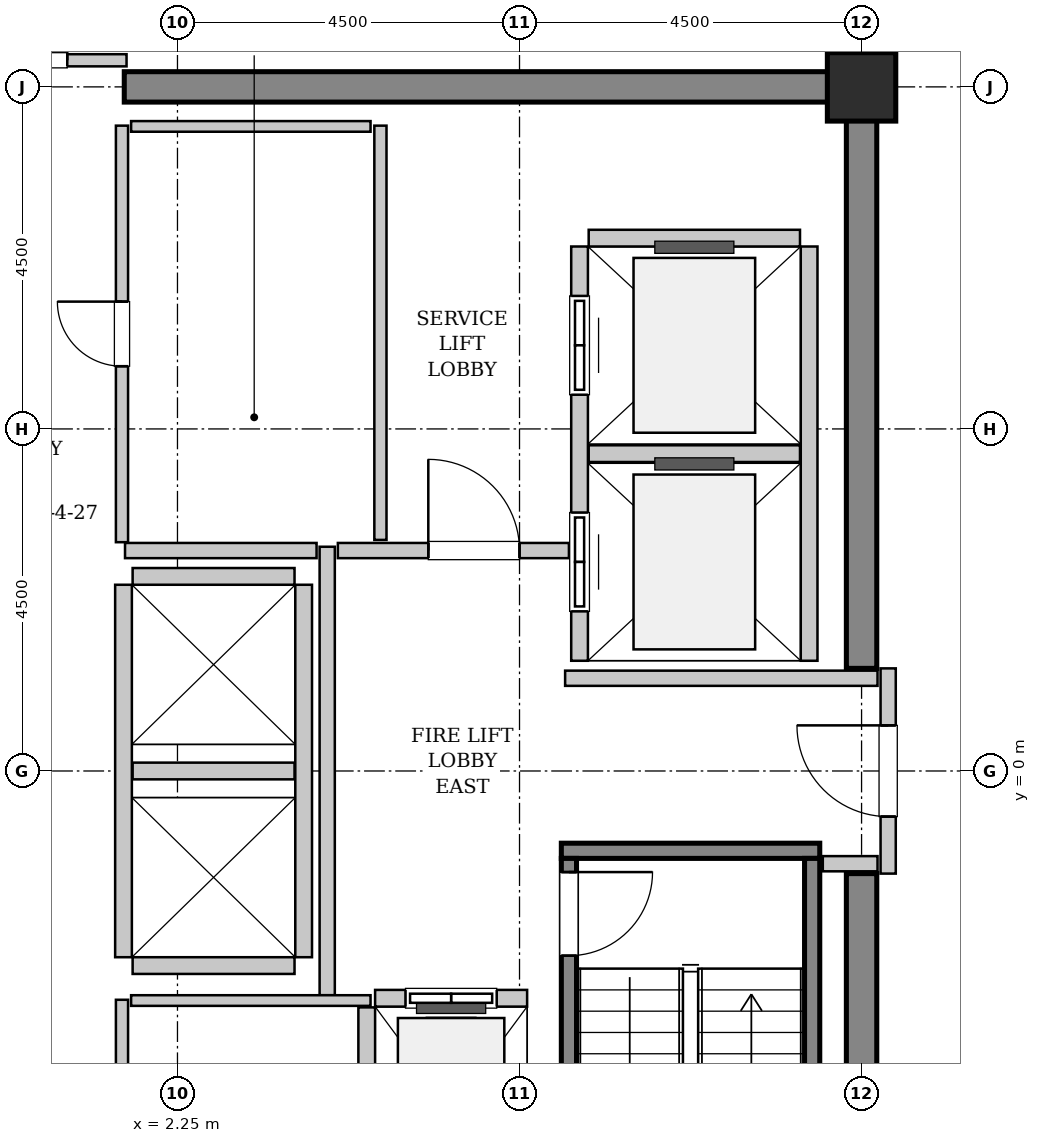
"""IFC4 building model, lengths in metres.
Left out: names, types, materials, properties, quantities, classifications, styles, units other than length and angle.
Written with IfcOpenShell. Run it as: python <this file> out.ifc"""

import sys

from ifc_helpers import new_model, si_unit, direction, frame, frame_2d, origin, origin_2d, place, context, subcontext, project, spatial, rectangle, extrude, source, transform, mapped, element, fill, save


model = new_model("IFC4")
c1 = context("Model", 3, precision=1e-05, world=origin(), true_north=direction((0.0, 1.0)))
c2 = subcontext(c1, "Body", "Model", "MODEL_VIEW")
j1 = project(units=[si_unit("LENGTHUNIT", "METRE"), si_unit("PLANEANGLEUNIT", "RADIAN")], contexts=[c1])
p1 = place(None, origin())
s1 = spatial("IfcSite", under=j1, at=p1, CompositionType="ELEMENT")
p2 = place(p1, origin())
s2 = spatial("IfcBuilding", under=s1, at=p2, CompositionType="ELEMENT")
p3 = place(p2, frame((0.0, 0.0, 341.4)))
s3 = spatial("IfcBuildingStorey", under=s2, at=p3, CompositionType="ELEMENT", Elevation=341.4)
m1 = source(origin(), c2, "Body", "SweptSolid", [
    extrude(rectangle(XDim=9.9, YDim=0.4, at=frame_2d((4.95, 0.0))), origin(), (0.0, 0.0, 1.0), 3.8),
])
p4 = place(p3, frame((1.55, 9.0, 0.0), z_axis=(0.0, 0.0, 1.0), x_axis=(1.0, 0.0, 0.0)))
e1 = element("IfcWall", 1, at=p4, inside=s3, PredefinedType="SHEAR", context=c2, shape_type="MappedRepresentation", body=[
    mapped(m1, transform((0.0, 0.0, 0.0), x_axis=(1.0, 0.0, 0.0), y_axis=(0.0, 1.0, 0.0), z_axis=(0.0, 0.0, 1.0), scale=1.0)),
])
m2 = source(origin(), c2, "Body", "SweptSolid", [
    extrude(rectangle(XDim=7.45, YDim=0.4, at=frame_2d((3.725, 0.0))), origin(), (0.0, 0.0, 1.0), 3.8),
])
for number, where, z_axis, x_axis in (
    (2, (11.25, -8.8, 0.0), (0.0, 0.0, 1.0), (0.0, 1.0, 0.0)),
    (3, (11.25, 1.35, 0.0), (0.0, 0.0, 1.0), (0.0, 1.0, 0.0)),
):
    element("IfcWall", number, at=place(p3, frame(where, z_axis=z_axis, x_axis=x_axis)), inside=s3, PredefinedType="SHEAR", context=c2, shape_type="MappedRepresentation", body=[
        mapped(m2, transform((0.0, 0.0, 0.0), x_axis=(1.0, 0.0, 0.0), y_axis=(0.0, 1.0, 0.0), z_axis=(0.0, 0.0, 1.0), scale=1.0)),
    ])
m3 = source(origin(), c2, "Body", "SweptSolid", [
    extrude(rectangle(XDim=0.9, YDim=0.9, at=origin_2d()), origin(), (0.0, 0.0, 1.0), 3.8),
])
p5 = place(p3, frame((11.25, 9.0, 0.0), z_axis=(0.0, 0.0, 1.0), x_axis=(1.0, 0.0, 0.0)))
e4 = element("IfcColumn", 4, at=p5, inside=s3, PredefinedType="COLUMN", context=c2, shape_type="MappedRepresentation", body=[
    mapped(m3, transform((0.0, 0.0, 0.0), x_axis=(1.0, 0.0, 0.0), y_axis=(0.0, 1.0, 0.0), z_axis=(0.0, 0.0, 1.0), scale=1.0)),
])
m4 = source(origin(), c2, "Body", "SweptSolid", [
    extrude(rectangle(XDim=3.4, YDim=0.2, at=frame_2d((1.7, 0.0))), origin(), (0.0, 0.0, 1.0), 3.8),
])
p6 = place(p3, frame((7.3, -1.05, 0.0), z_axis=(0.0, 0.0, 1.0), x_axis=(1.0, 0.0, 0.0)))
e5 = element("IfcWall", 5, at=p6, inside=s3, PredefinedType="SOLIDWALL", context=c2, shape_type="MappedRepresentation", body=[
    mapped(m4, transform((0.0, 0.0, 0.0), x_axis=(1.0, 0.0, 0.0), y_axis=(0.0, 1.0, 0.0), z_axis=(0.0, 0.0, 1.0), scale=1.0)),
])
m5 = source(origin(), c2, "Body", "SweptSolid", [
    extrude(rectangle(XDim=7.1, YDim=0.2, at=frame_2d((3.55, 0.0))), origin(), (0.0, 0.0, 1.0), 3.8),
])
p7 = place(p3, frame((7.4, -1.15, 0.0), z_axis=(0.0, 0.0, 1.0), x_axis=(0.0, -1.0, 0.0)))
e6 = element("IfcWall", 6, at=p7, inside=s3, PredefinedType="SOLIDWALL", context=c2, shape_type="MappedRepresentation", body=[
    mapped(m5, transform((0.0, 0.0, 0.0), x_axis=(1.0, 0.0, 0.0), y_axis=(0.0, 1.0, 0.0), z_axis=(0.0, 0.0, 1.0), scale=1.0)),
])
p8 = place(p7, frame((0.18, 0.0, 0.0)))
e7 = element("IfcOpeningElement", 7, at=p8, cuts=e6, PredefinedType="OPENING", context=c2, shape_type="SweptSolid", body=[
    extrude(rectangle(XDim=1.1, YDim=2.15, at=frame_2d((0.55, 1.075))), frame((0.0, 0.11, 0.0), z_axis=(0.0, -1.0, 0.0), x_axis=(1.0, 0.0, 0.0)), (0.0, 0.0, 1.0), 0.22),
])
p9 = place(p3, frame((10.6, -1.15, 0.0), z_axis=(0.0, 0.0, 1.0), x_axis=(0.0, -1.0, 0.0)))
e8 = element("IfcWall", 8, at=p9, inside=s3, PredefinedType="SOLIDWALL", context=c2, shape_type="MappedRepresentation", body=[
    mapped(m5, transform((0.0, 0.0, 0.0), x_axis=(1.0, 0.0, 0.0), y_axis=(0.0, 1.0, 0.0), z_axis=(0.0, 0.0, 1.0), scale=1.0)),
])
m6 = source(origin(), c2, "Body", "SweptSolid", [
    extrude(rectangle(XDim=2.0, YDim=0.22, at=frame_2d((1.0, 0.0))), origin(), (0.0, 0.0, 1.0), 3.535),
])
p10 = place(p3, frame((6.85, -2.99, 0.0), z_axis=(0.0, 0.0, 1.0), x_axis=(-1.0, 0.0, 0.0)))
e9 = element("IfcWall", 9, at=p10, inside=s3, PredefinedType="SOLIDWALL", context=c2, shape_type="MappedRepresentation", body=[
    mapped(m6, transform((0.0, 0.0, 0.0), x_axis=(1.0, 0.0, 0.0), y_axis=(0.0, 1.0, 0.0), z_axis=(0.0, 0.0, 1.0), scale=1.0)),
])
p11 = place(p10, frame((0.4, 0.0, 0.0)))
e10 = element("IfcOpeningElement", 10, at=p11, cuts=e9, PredefinedType="OPENING", context=c2, shape_type="SweptSolid", body=[
    extrude(rectangle(XDim=1.2, YDim=2.2, at=frame_2d((0.6, 1.1))), frame((0.0, 0.12, 0.0), z_axis=(0.0, -1.0, 0.0), x_axis=(1.0, 0.0, 0.0)), (0.0, 0.0, 1.0), 0.24),
])
m7 = source(origin(), c2, "Body", "SweptSolid", [
    extrude(rectangle(XDim=2.68, YDim=0.22, at=frame_2d((1.34, 0.0))), origin(), (0.0, 0.0, 1.0), 3.535),
])
p12 = place(p3, frame((4.74, -3.11, 0.0), z_axis=(0.0, 0.0, 1.0), x_axis=(0.0, -1.0, 0.0)))
e11 = element("IfcWall", 11, at=p12, inside=s3, PredefinedType="SOLIDWALL", context=c2, shape_type="MappedRepresentation", body=[
    mapped(m7, transform((0.0, 0.0, 0.0), x_axis=(1.0, 0.0, 0.0), y_axis=(0.0, 1.0, 0.0), z_axis=(0.0, 0.0, 1.0), scale=1.0)),
])
m8 = source(origin(), c2, "Body", "SweptSolid", [
    extrude(rectangle(XDim=5.45, YDim=0.22, at=frame_2d((2.725, 0.0))), origin(), (0.0, 0.0, 1.0), 3.535),
])
p13 = place(p3, frame((7.54, 6.9, 0.0), z_axis=(0.0, 0.0, 1.0), x_axis=(0.0, -1.0, 0.0)))
e12 = element("IfcWall", 12, at=p13, inside=s3, PredefinedType="SOLIDWALL", context=c2, shape_type="MappedRepresentation", body=[
    mapped(m8, transform((0.0, 0.0, 0.0), x_axis=(1.0, 0.0, 0.0), y_axis=(0.0, 1.0, 0.0), z_axis=(0.0, 0.0, 1.0), scale=1.0)),
])
p14 = place(p13, frame((3.5, 0.0, 0.0)))
e13 = element("IfcOpeningElement", 13, at=p14, cuts=e12, PredefinedType="OPENING", context=c2, shape_type="SweptSolid", body=[
    extrude(rectangle(XDim=1.3, YDim=2.3, at=frame_2d((0.65, 1.15))), frame((0.0, 0.12, 0.0), z_axis=(0.0, -1.0, 0.0), x_axis=(1.0, 0.0, 0.0)), (0.0, 0.0, 1.0), 0.24),
])
p15 = place(p13, frame((0.65, 0.0, 0.0)))
e14 = element("IfcOpeningElement", 14, at=p15, cuts=e12, PredefinedType="OPENING", context=c2, shape_type="SweptSolid", body=[
    extrude(rectangle(XDim=1.3, YDim=2.3, at=frame_2d((0.65, 1.15))), frame((0.0, 0.12, 0.0), z_axis=(0.0, -1.0, 0.0), x_axis=(1.0, 0.0, 0.0)), (0.0, 0.0, 1.0), 0.24),
])
p16 = place(p3, frame((10.56, 1.45, 0.0), z_axis=(0.0, 0.0, 1.0), x_axis=(0.0, 1.0, 0.0)))
e15 = element("IfcWall", 15, at=p16, inside=s3, PredefinedType="SOLIDWALL", context=c2, shape_type="MappedRepresentation", body=[
    mapped(m8, transform((0.0, 0.0, 0.0), x_axis=(1.0, 0.0, 0.0), y_axis=(0.0, 1.0, 0.0), z_axis=(0.0, 0.0, 1.0), scale=1.0)),
])
m9 = source(origin(), c2, "Body", "SweptSolid", [
    extrude(rectangle(XDim=2.78, YDim=0.22, at=frame_2d((1.39, 0.0))), origin(), (0.0, 0.0, 1.0), 3.535),
])
for number, where, z_axis, x_axis in (
    (16, (7.66, 4.175, 0.0), (0.0, 0.0, 1.0), (1.0, 0.0, 0.0)),
    (17, (10.44, 7.01, 0.0), (0.0, 0.0, 1.0), (-1.0, 0.0, 0.0)),
):
    element("IfcWall", number, at=place(p3, frame(where, z_axis=z_axis, x_axis=x_axis)), inside=s3, PredefinedType="SOLIDWALL", context=c2, shape_type="MappedRepresentation", body=[
        mapped(m9, transform((0.0, 0.0, 0.0), x_axis=(1.0, 0.0, 0.0), y_axis=(0.0, 1.0, 0.0), z_axis=(0.0, 0.0, 1.0), scale=1.0)),
    ])
m10 = source(origin(), c2, "Body", "SweptSolid", [
    extrude(rectangle(XDim=4.9, YDim=0.22, at=frame_2d((2.45, 0.0))), origin(), (0.0, 0.0, 1.0), 3.535),
])
for number, where, z_axis, x_axis in (
    (18, (1.54, 2.45, 0.0), (0.0, 0.0, 1.0), (0.0, -1.0, 0.0)),
    (19, (3.91, -2.45, 0.0), (0.0, 0.0, 1.0), (0.0, 1.0, 0.0)),
):
    element("IfcWall", number, at=place(p3, frame(where, z_axis=z_axis, x_axis=x_axis)), inside=s3, PredefinedType="SOLIDWALL", context=c2, shape_type="MappedRepresentation", body=[
        mapped(m10, transform((0.0, 0.0, 0.0), x_axis=(1.0, 0.0, 0.0), y_axis=(0.0, 1.0, 0.0), z_axis=(0.0, 0.0, 1.0), scale=1.0)),
    ])
m11 = source(origin(), c2, "Body", "SweptSolid", [
    extrude(rectangle(XDim=2.13, YDim=0.22, at=frame_2d((1.065, 0.0))), origin(), (0.0, 0.0, 1.0), 3.535),
])
for number, where, z_axis, x_axis in (
    (20, (1.66, -2.56, 0.0), (0.0, 0.0, 1.0), (1.0, 0.0, 0.0)),
    (21, (1.66, 0.0, 0.0), (0.0, 0.0, 1.0), (1.0, 0.0, 0.0)),
    (22, (3.79, 2.56, 0.0), (0.0, 0.0, 1.0), (-1.0, 0.0, 0.0)),
):
    element("IfcWall", number, at=place(p3, frame(where, z_axis=z_axis, x_axis=x_axis)), inside=s3, PredefinedType="SOLIDWALL", context=c2, shape_type="MappedRepresentation", body=[
        mapped(m11, transform((0.0, 0.0, 0.0), x_axis=(1.0, 0.0, 0.0), y_axis=(0.0, 1.0, 0.0), z_axis=(0.0, 0.0, 1.0), scale=1.0)),
    ])
m12 = source(origin(), c2, "Body", "SweptSolid", [
    extrude(rectangle(XDim=2.7, YDim=0.2, at=frame_2d((1.35, 0.0))), origin(), (0.0, 0.0, 1.0), 2.625),
])
p17 = place(p3, frame((11.6, -1.35, 0.0), z_axis=(0.0, 0.0, 1.0), x_axis=(0.0, 1.0, 0.0)))
e23 = element("IfcWall", 23, at=p17, inside=s3, PredefinedType="PARTITIONING", context=c2, shape_type="MappedRepresentation", body=[
    mapped(m12, transform((0.0, 0.0, 0.0), x_axis=(1.0, 0.0, 0.0), y_axis=(0.0, 1.0, 0.0), z_axis=(0.0, 0.0, 1.0), scale=1.0)),
])
p18 = place(p17, frame((0.75, 0.0, 0.0)))
e24 = element("IfcOpeningElement", 24, at=p18, cuts=e23, PredefinedType="OPENING", context=c2, shape_type="SweptSolid", body=[
    extrude(rectangle(XDim=1.2, YDim=2.15, at=frame_2d((0.6, 1.075))), frame((0.0, 0.11, 0.0), z_axis=(0.0, -1.0, 0.0), x_axis=(1.0, 0.0, 0.0)), (0.0, 0.0, 1.0), 0.22),
])
m13 = source(origin(), c2, "Body", "SweptSolid", [
    extrude(rectangle(XDim=5.9, YDim=0.2, at=frame_2d((2.95, 0.0))), origin(), (0.0, 0.0, 1.0), 3.535),
])
p19 = place(p3, frame((4.22, -2.95, 0.0), z_axis=(0.0, 0.0, 1.0), x_axis=(0.0, 1.0, 0.0)))
e25 = element("IfcWall", 25, at=p19, inside=s3, PredefinedType="PARTITIONING", context=c2, shape_type="MappedRepresentation", body=[
    mapped(m13, transform((0.0, 0.0, 0.0), x_axis=(1.0, 0.0, 0.0), y_axis=(0.0, 1.0, 0.0), z_axis=(0.0, 0.0, 1.0), scale=1.0)),
])
m14 = source(origin(), c2, "Body", "SweptSolid", [
    extrude(rectangle(XDim=2.52, YDim=0.2, at=frame_2d((1.26, 0.0))), origin(), (0.0, 0.0, 1.0), 3.535),
])
p20 = place(p3, frame((1.56, 2.9, 0.0), z_axis=(0.0, 0.0, 1.0), x_axis=(1.0, 0.0, 0.0)))
e26 = element("IfcWall", 26, at=p20, inside=s3, PredefinedType="PARTITIONING", context=c2, shape_type="MappedRepresentation", body=[
    mapped(m14, transform((0.0, 0.0, 0.0), x_axis=(1.0, 0.0, 0.0), y_axis=(0.0, 1.0, 0.0), z_axis=(0.0, 0.0, 1.0), scale=1.0)),
])
m15 = source(origin(), c2, "Body", "SweptSolid", [
    extrude(rectangle(XDim=3.04, YDim=0.2, at=frame_2d((1.52, 0.0))), origin(), (0.0, 0.0, 1.0), 3.535),
])
p21 = place(p3, frame((4.36, 2.9, 0.0), z_axis=(0.0, 0.0, 1.0), x_axis=(1.0, 0.0, 0.0)))
e27 = element("IfcWall", 27, at=p21, inside=s3, PredefinedType="PARTITIONING", context=c2, shape_type="MappedRepresentation", body=[
    mapped(m15, transform((0.0, 0.0, 0.0), x_axis=(1.0, 0.0, 0.0), y_axis=(0.0, 1.0, 0.0), z_axis=(0.0, 0.0, 1.0), scale=1.0)),
])
p22 = place(p21, frame((1.19, 0.0, 0.0)))
e28 = element("IfcOpeningElement", 28, at=p22, cuts=e27, PredefinedType="OPENING", context=c2, shape_type="SweptSolid", body=[
    extrude(rectangle(XDim=1.2, YDim=2.15, at=frame_2d((0.6, 1.075))), frame((0.0, 0.11, 0.0), z_axis=(0.0, -1.0, 0.0), x_axis=(1.0, 0.0, 0.0)), (0.0, 0.0, 1.0), 0.22),
])
m16 = source(origin(), c2, "Body", "SweptSolid", [
    extrude(rectangle(XDim=4.11, YDim=0.2, at=frame_2d((2.055, 0.0))), origin(), (0.0, 0.0, 1.0), 3.535),
])
p23 = place(p3, frame((7.35, 1.22, 0.0), z_axis=(0.0, 0.0, 1.0), x_axis=(1.0, 0.0, 0.0)))
e29 = element("IfcWall", 29, at=p23, inside=s3, PredefinedType="PARTITIONING", context=c2, shape_type="MappedRepresentation", body=[
    mapped(m16, transform((0.0, 0.0, 0.0), x_axis=(1.0, 0.0, 0.0), y_axis=(0.0, 1.0, 0.0), z_axis=(0.0, 0.0, 1.0), scale=1.0)),
])
m17 = source(origin(), c2, "Body", "SweptSolid", [
    extrude(rectangle(XDim=0.72, YDim=0.2, at=frame_2d((0.36, 0.0))), origin(), (0.0, 0.0, 1.0), 3.535),
])
p24 = place(p3, frame((10.74, -1.22, 0.0), z_axis=(0.0, 0.0, 1.0), x_axis=(1.0, 0.0, 0.0)))
e30 = element("IfcWall", 30, at=p24, inside=s3, PredefinedType="PARTITIONING", context=c2, shape_type="MappedRepresentation", body=[
    mapped(m17, transform((0.0, 0.0, 0.0), x_axis=(1.0, 0.0, 0.0), y_axis=(0.0, 1.0, 0.0), z_axis=(0.0, 0.0, 1.0), scale=1.0)),
])
m18 = source(origin(), c2, "Body", "SweptSolid", [
    extrude(rectangle(XDim=3.16, YDim=0.16, at=frame_2d((1.58, 0.0))), origin(), (0.0, 0.0, 1.0), 2.625),
])
p25 = place(p3, frame((-1.58, 9.35, 0.0), z_axis=(0.0, 0.0, 1.0), x_axis=(1.0, 0.0, 0.0)))
e31 = element("IfcWall", 31, at=p25, inside=s3, PredefinedType="PARTITIONING", context=c2, shape_type="MappedRepresentation", body=[
    mapped(m18, transform((0.0, 0.0, 0.0), x_axis=(1.0, 0.0, 0.0), y_axis=(0.0, 1.0, 0.0), z_axis=(0.0, 0.0, 1.0), scale=1.0)),
])
p26 = place(p25, frame((0.78, 0.0, 0.0)))
e32 = element("IfcOpeningElement", 32, at=p26, cuts=e31, PredefinedType="OPENING", context=c2, shape_type="SweptSolid", body=[
    extrude(rectangle(XDim=1.6, YDim=2.3, at=frame_2d((0.8, 1.15))), frame((0.0, 0.09, 0.0), z_axis=(0.0, -1.0, 0.0), x_axis=(1.0, 0.0, 0.0)), (0.0, 0.0, 1.0), 0.18),
])
m19 = source(origin(), c2, "Body", "SweptSolid", [
    extrude(rectangle(XDim=5.45, YDim=0.16, at=frame_2d((2.725, 0.0))), origin(), (0.0, 0.0, 1.0), 3.535),
])
p27 = place(p3, frame((4.92, 3.04, 0.0), z_axis=(0.0, 0.0, 1.0), x_axis=(0.0, 1.0, 0.0)))
e33 = element("IfcWall", 33, at=p27, inside=s3, PredefinedType="PARTITIONING", context=c2, shape_type="MappedRepresentation", body=[
    mapped(m19, transform((0.0, 0.0, 0.0), x_axis=(1.0, 0.0, 0.0), y_axis=(0.0, 1.0, 0.0), z_axis=(0.0, 0.0, 1.0), scale=1.0)),
])
m20 = source(origin(), c2, "Body", "SweptSolid", [
    extrude(rectangle(XDim=5.48, YDim=0.16, at=frame_2d((2.74, 0.0))), origin(), (0.0, 0.0, 1.0), 3.535),
])
p28 = place(p3, frame((1.52, 3.01, 0.0), z_axis=(0.0, 0.0, 1.0), x_axis=(0.0, 1.0, 0.0)))
e34 = element("IfcWall", 34, at=p28, inside=s3, PredefinedType="PARTITIONING", context=c2, shape_type="MappedRepresentation", body=[
    mapped(m20, transform((0.0, 0.0, 0.0), x_axis=(1.0, 0.0, 0.0), y_axis=(0.0, 1.0, 0.0), z_axis=(0.0, 0.0, 1.0), scale=1.0)),
])
p29 = place(p28, frame((2.315, 0.0, 0.0)))
e35 = element("IfcOpeningElement", 35, at=p29, cuts=e34, PredefinedType="OPENING", context=c2, shape_type="SweptSolid", body=[
    extrude(rectangle(XDim=0.85, YDim=2.1, at=frame_2d((0.425, 1.05))), frame((0.0, 0.09, 0.0), z_axis=(0.0, -1.0, 0.0), x_axis=(1.0, 0.0, 0.0)), (0.0, 0.0, 1.0), 0.18),
])
m21 = source(origin(), c2, "Body", "SweptSolid", [
    extrude(rectangle(XDim=3.15, YDim=0.14, at=frame_2d((1.575, 0.0))), origin(), (0.0, 0.0, 1.0), 3.535),
])
p30 = place(p3, frame((1.64, 8.48, 0.0), z_axis=(0.0, 0.0, 1.0), x_axis=(1.0, 0.0, 0.0)))
e36 = element("IfcWall", 36, at=p30, inside=s3, PredefinedType="PARTITIONING", context=c2, shape_type="MappedRepresentation", body=[
    mapped(m21, transform((0.0, 0.0, 0.0), x_axis=(1.0, 0.0, 0.0), y_axis=(0.0, 1.0, 0.0), z_axis=(0.0, 0.0, 1.0), scale=1.0)),
])
p31 = place(p3, frame((1.52, -8.49, 0.0), z_axis=(0.0, 0.0, 1.0), x_axis=(0.0, 1.0, 0.0)))
e37 = element("IfcWall", 37, at=p31, inside=s3, PredefinedType="PARTITIONING", context=c2, shape_type="MappedRepresentation", body=[
    mapped(m20, transform((0.0, 0.0, 0.0), x_axis=(1.0, 0.0, 0.0), y_axis=(0.0, 1.0, 0.0), z_axis=(0.0, 0.0, 1.0), scale=1.0)),
])
p32 = place(p31, frame((2.315, 0.0, 0.0)))
e38 = element("IfcOpeningElement", 38, at=p32, cuts=e37, PredefinedType="OPENING", context=c2, shape_type="SweptSolid", body=[
    extrude(rectangle(XDim=0.85, YDim=2.1, at=frame_2d((0.425, 1.05))), frame((0.0, 0.09, 0.0), z_axis=(0.0, -1.0, 0.0), x_axis=(1.0, 0.0, 0.0)), (0.0, 0.0, 1.0), 0.18),
])
p33 = place(p3, frame((1.64, -3.02, 0.0), z_axis=(0.0, 0.0, 1.0), x_axis=(1.0, 0.0, 0.0)))
e39 = element("IfcWall", 39, at=p33, inside=s3, PredefinedType="PARTITIONING", context=c2, shape_type="MappedRepresentation", body=[
    mapped(m21, transform((0.0, 0.0, 0.0), x_axis=(1.0, 0.0, 0.0), y_axis=(0.0, 1.0, 0.0), z_axis=(0.0, 0.0, 1.0), scale=1.0)),
])
m22 = source(origin(), c2, "Body", "SweptSolid", [
    extrude(rectangle(XDim=1.1, YDim=2.15, at=frame_2d((0.55, 1.075))), frame((0.0, 0.025, 0.0), z_axis=(0.0, -1.0, 0.0), x_axis=(1.0, 0.0, 0.0)), (0.0, 0.0, 1.0), 0.05),
])
p34 = place(p8, origin())
e40 = element("IfcDoor", 40, at=p34, inside=s3, OperationType="SINGLE_SWING_LEFT", PredefinedType="DOOR", context=c2, shape_type="MappedRepresentation", body=[
    mapped(m22, transform((0.0, 0.0, 0.0), x_axis=(1.0, 0.0, 0.0), y_axis=(0.0, 1.0, 0.0), z_axis=(0.0, 0.0, 1.0), scale=1.0)),
])
fill(e7, e40)
m23 = source(origin(), c2, "Body", "SweptSolid", [
    extrude(rectangle(XDim=1.2, YDim=2.2, at=frame_2d((0.6, 1.1))), frame((0.0, 0.025, 0.0), z_axis=(0.0, -1.0, 0.0), x_axis=(1.0, 0.0, 0.0)), (0.0, 0.0, 1.0), 0.05),
])
p35 = place(p11, origin())
e41 = element("IfcDoor", 41, at=p35, inside=s3, OperationType="SLIDING_TO_LEFT", PredefinedType="DOOR", context=c2, shape_type="MappedRepresentation", body=[
    mapped(m23, transform((0.0, 0.0, 0.0), x_axis=(1.0, 0.0, 0.0), y_axis=(0.0, 1.0, 0.0), z_axis=(0.0, 0.0, 1.0), scale=1.0)),
])
fill(e10, e41)
m24 = source(origin(), c2, "Body", "SweptSolid", [
    extrude(rectangle(XDim=1.3, YDim=2.3, at=frame_2d((0.65, 1.15))), frame((0.0, 0.025, 0.0), z_axis=(0.0, -1.0, 0.0), x_axis=(1.0, 0.0, 0.0)), (0.0, 0.0, 1.0), 0.05),
])
p36 = place(p14, origin())
e42 = element("IfcDoor", 42, at=p36, inside=s3, OperationType="SLIDING_TO_RIGHT", PredefinedType="DOOR", context=c2, shape_type="MappedRepresentation", body=[
    mapped(m24, transform((0.0, 0.0, 0.0), x_axis=(1.0, 0.0, 0.0), y_axis=(0.0, 1.0, 0.0), z_axis=(0.0, 0.0, 1.0), scale=1.0)),
])
fill(e13, e42)
p37 = place(p15, origin())
e43 = element("IfcDoor", 43, at=p37, inside=s3, OperationType="SLIDING_TO_RIGHT", PredefinedType="DOOR", context=c2, shape_type="MappedRepresentation", body=[
    mapped(m24, transform((0.0, 0.0, 0.0), x_axis=(1.0, 0.0, 0.0), y_axis=(0.0, 1.0, 0.0), z_axis=(0.0, 0.0, 1.0), scale=1.0)),
])
fill(e14, e43)
m25 = source(origin(), c2, "Body", "SweptSolid", [
    extrude(rectangle(XDim=1.2, YDim=2.15, at=frame_2d((0.6, 1.075))), frame((0.0, 0.025, 0.0), z_axis=(0.0, -1.0, 0.0), x_axis=(1.0, 0.0, 0.0)), (0.0, 0.0, 1.0), 0.05),
])
p38 = place(p18, origin())
e44 = element("IfcDoor", 44, at=p38, inside=s3, OperationType="SINGLE_SWING_RIGHT", PredefinedType="DOOR", context=c2, shape_type="MappedRepresentation", body=[
    mapped(m25, transform((0.0, 0.0, 0.0), x_axis=(1.0, 0.0, 0.0), y_axis=(0.0, 1.0, 0.0), z_axis=(0.0, 0.0, 1.0), scale=1.0)),
])
fill(e24, e44)
p39 = place(p22, origin())
e45 = element("IfcDoor", 45, at=p39, inside=s3, OperationType="SINGLE_SWING_LEFT", PredefinedType="DOOR", context=c2, shape_type="MappedRepresentation", body=[
    mapped(m25, transform((0.0, 0.0, 0.0), x_axis=(1.0, 0.0, 0.0), y_axis=(0.0, 1.0, 0.0), z_axis=(0.0, 0.0, 1.0), scale=1.0)),
])
fill(e28, e45)
m26 = source(origin(), c2, "Body", "SweptSolid", [
    extrude(rectangle(XDim=1.6, YDim=2.3, at=frame_2d((0.8, 1.15))), frame((0.0, 0.025, 0.0), z_axis=(0.0, -1.0, 0.0), x_axis=(1.0, 0.0, 0.0)), (0.0, 0.0, 1.0), 0.05),
])
p40 = place(p26, origin())
e46 = element("IfcDoor", 46, at=p40, inside=s3, OperationType="DOUBLE_DOOR_SINGLE_SWING", PredefinedType="DOOR", context=c2, shape_type="MappedRepresentation", body=[
    mapped(m26, transform((0.0, 0.0, 0.0), x_axis=(1.0, 0.0, 0.0), y_axis=(0.0, 1.0, 0.0), z_axis=(0.0, 0.0, 1.0), scale=1.0)),
])
fill(e32, e46)
m27 = source(origin(), c2, "Body", "SweptSolid", [
    extrude(rectangle(XDim=0.85, YDim=2.1, at=frame_2d((0.425, 1.05))), frame((0.0, 0.025, 0.0), z_axis=(0.0, -1.0, 0.0), x_axis=(1.0, 0.0, 0.0)), (0.0, 0.0, 1.0), 0.05),
])
p41 = place(p29, origin())
e47 = element("IfcDoor", 47, at=p41, inside=s3, OperationType="SINGLE_SWING_RIGHT", PredefinedType="DOOR", context=c2, shape_type="MappedRepresentation", body=[
    mapped(m27, transform((0.0, 0.0, 0.0), x_axis=(1.0, 0.0, 0.0), y_axis=(0.0, 1.0, 0.0), z_axis=(0.0, 0.0, 1.0), scale=1.0)),
])
fill(e35, e47)
save(model, sys.argv[1])
